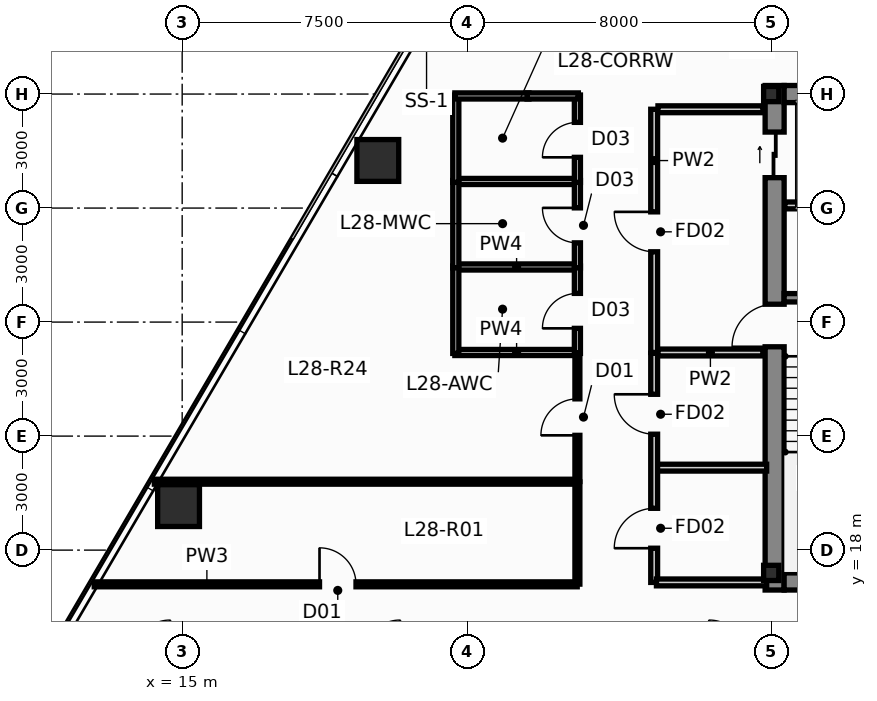
"""IFC4 building model, lengths in metres.
Left out: names, types, materials, properties, quantities, classifications, styles, units other than length and angle.
Written with IfcOpenShell. Run it as: python <this file> out.ifc"""

import sys

from ifc_helpers import new_model, si_unit, direction, frame, frame_2d, origin, origin_2d, place, context, subcontext, project, spatial, rectangle, hollow_rectangle, i_section, extrude, source, transform, mapped, element, fill, save


model = new_model("IFC4")
c1 = context("Model", 3, precision=1e-05, world=origin(), true_north=direction((0.0, 1.0)))
c2 = subcontext(c1, "Body", "Model", "MODEL_VIEW")
j1 = project(units=[si_unit("LENGTHUNIT", "METRE"), si_unit("PLANEANGLEUNIT", "RADIAN")], contexts=[c1])
p1 = place(None, origin())
s1 = spatial("IfcSite", under=j1, at=p1, CompositionType="ELEMENT")
p2 = place(p1, origin())
s2 = spatial("IfcBuilding", under=s1, at=p2, CompositionType="ELEMENT")
p3 = place(p2, frame((0.0, 0.0, 109.05)))
s3 = spatial("IfcBuildingStorey", under=s2, at=p3, CompositionType="ELEMENT", Elevation=109.05)
m1 = source(origin(), c2, "Body", "SweptSolid", [
    extrude(i_section(OverallWidth=0.4, OverallDepth=0.4, WebThickness=0.02, FlangeThickness=0.032, at=origin_2d()), origin(), (0.0, 0.0, 1.0), 3.65),
])
for number, where, z_axis, x_axis in (
    (1, (30.5, 17.4, 0.0), (0.0, 0.0, 1.0), (1.0, 0.0, 0.0)),
    (2, (30.5, 30.0, 0.0), (0.0, 0.0, 1.0), (1.0, 0.0, 0.0)),
):
    element("IfcColumn", number, at=place(p3, frame(where, z_axis=z_axis, x_axis=x_axis)), inside=s3, PredefinedType="COLUMN", context=c2, shape_type="MappedRepresentation", body=[
        mapped(m1, transform((0.0, 0.0, 0.0), scale=1.0)),
    ])
p4 = place(p3, frame((30.59, 16.95, 0.0), z_axis=(0.0, 0.0, 1.0), x_axis=(0.0, 1.0, 0.0)))
e3 = element("IfcWall", 3, at=p4, inside=s3, PredefinedType="SHEAR", context=c2, shape_type="SweptSolid", body=[
    extrude(rectangle(XDim=13.275, YDim=0.5, at=frame_2d((6.638, 0.0))), origin(), (0.0, 0.0, 1.0), 3.65),
])
p5 = place(p4, frame((6.4, 0.0, 0.0)))
e4 = element("IfcOpeningElement", 4, at=p5, cuts=e3, PredefinedType="OPENING", context=c2, shape_type="SweptSolid", body=[
    extrude(rectangle(XDim=1.12, YDim=2.15, at=frame_2d((0.56, 1.075))), frame((0.0, 0.262, 0.0), z_axis=(0.0, -1.0, 0.0), x_axis=(1.0, 0.0, 0.0)), (0.0, 0.0, 1.0), 0.524),
])
p6 = place(p4, frame((10.85, 0.0, 0.0)))
e5 = element("IfcOpeningElement", 5, at=p6, cuts=e3, PredefinedType="OPENING", context=c2, shape_type="SweptSolid", body=[
    extrude(rectangle(XDim=1.2, YDim=2.2, at=frame_2d((0.6, 1.1))), frame((0.0, 0.262, 0.0), z_axis=(0.0, -1.0, 0.0), x_axis=(1.0, 0.0, 0.0)), (0.0, 0.0, 1.0), 0.524),
])
for number, where, z_axis, x_axis in (
    (6, (30.84, 17.175, 0.0), (0.0, 0.0, 1.0), (1.0, 0.0, 0.0)),
    (7, (30.84, 30.0, 0.0), (0.0, 0.0, 1.0), (1.0, 0.0, 0.0)),
):
    element("IfcWall", number, at=place(p3, frame(where, z_axis=z_axis, x_axis=x_axis)), inside=s3, PredefinedType="SHEAR", context=c2, shape_type="SweptSolid", body=[
        extrude(rectangle(XDim=2.9, YDim=0.45, at=frame_2d((1.45, 0.0))), origin(), (0.0, 0.0, 1.0), 3.65),
    ])
p7 = place(p3, frame((30.84, 24.64, 0.0), z_axis=(0.0, 0.0, 1.0), x_axis=(1.0, 0.0, 0.0)))
e8 = element("IfcWall", 8, at=p7, inside=s3, PredefinedType="SHEAR", context=c2, shape_type="SweptSolid", body=[
    extrude(rectangle(XDim=2.9, YDim=0.22, at=frame_2d((1.45, 0.0))), origin(), (0.0, 0.0, 1.0), 3.65),
])
m2 = source(origin(), c2, "Body", "SweptSolid", [
    extrude(hollow_rectangle(XDim=1.1, YDim=1.1, WallThickness=0.06, at=origin_2d()), origin(), (0.0, 0.0, 1.0), 3.651),
])
p8 = place(p3, frame((20.148, 28.253, 0.0), z_axis=(0.014913313399, -0.013776424037, 0.999793880369), x_axis=(0.678553674548, 0.734550822447, 0.0)))
e9 = element("IfcColumn", 9, at=p8, inside=s3, PredefinedType="COLUMN", context=c2, shape_type="MappedRepresentation", body=[
    mapped(m2, transform((0.0, 0.0, 0.0), scale=1.0)),
])
m3 = source(origin(), c2, "Body", "SweptSolid", [
    extrude(hollow_rectangle(XDim=1.1, YDim=1.1, WallThickness=0.06, at=origin_2d()), origin(), (0.0, 0.0, 1.0), 3.651),
])
p9 = place(p3, frame((14.905, 19.171, 0.0), z_axis=(0.010431780378, -0.021599135014, 0.999712286273), x_axis=(0.900476348161, 0.434904985489, 0.0)))
e10 = element("IfcColumn", 10, at=p9, inside=s3, PredefinedType="COLUMN", context=c2, shape_type="MappedRepresentation", body=[
    mapped(m3, transform((0.0, 0.0, 0.0), scale=1.0)),
])
p10 = place(p3, frame((27.42, 23.2, 0.0), z_axis=(0.0, 0.0, 1.0), x_axis=(0.0, 1.0, 0.0)))
e11 = element("IfcWall", 11, at=p10, inside=s3, PredefinedType="PARTITIONING", context=c2, shape_type="SweptSolid", body=[
    extrude(rectangle(XDim=6.4, YDim=0.18, at=frame_2d((3.2, 0.0))), origin(), (0.0, 0.0, 1.0), 3.026),
])
p11 = place(p10, frame((2.65, 0.0, 0.0)))
e12 = element("IfcOpeningElement", 12, at=p11, cuts=e11, PredefinedType="OPENING", context=c2, shape_type="SweptSolid", body=[
    extrude(rectangle(XDim=1.05, YDim=2.15, at=frame_2d((0.525, 1.075))), frame((0.0, 0.102, 0.0), z_axis=(0.0, -1.0, 0.0), x_axis=(1.0, 0.0, 0.0)), (0.0, 0.0, 1.0), 0.204),
])
p12 = place(p3, frame((27.52, 23.2, 0.0), z_axis=(0.0, 0.0, 1.0), x_axis=(1.0, 0.0, 0.0)))
e13 = element("IfcWall", 13, at=p12, inside=s3, PredefinedType="PARTITIONING", context=c2, shape_type="SweptSolid", body=[
    extrude(rectangle(XDim=2.76, YDim=0.18, at=frame_2d((1.38, 0.0))), origin(), (0.0, 0.0, 1.0), 3.4),
])
p13 = place(p3, frame((27.52, 29.6, 0.0), z_axis=(0.0, 0.0, 1.0), x_axis=(1.0, 0.0, 0.0)))
e14 = element("IfcWall", 14, at=p13, inside=s3, PredefinedType="PARTITIONING", context=c2, shape_type="SweptSolid", body=[
    extrude(rectangle(XDim=2.76, YDim=0.18, at=frame_2d((1.38, 0.0))), origin(), (0.0, 0.0, 1.0), 2.783),
])
for number, where, z_axis, x_axis in (
    (15, (30.86, 27.07, 0.0), (0.0, 0.0, 1.0), (1.0, 0.0, 0.0)),
    (16, (27.48, 20.17, 0.0), (0.0, 0.0, 1.0), (1.0, 0.0, 0.0)),
):
    element("IfcWall", number, at=place(p3, frame(where, z_axis=z_axis, x_axis=x_axis)), inside=s3, PredefinedType="PARTITIONING", context=c2, shape_type="SweptSolid", body=[
        extrude(rectangle(XDim=2.9, YDim=0.18, at=frame_2d((1.45, 0.0))), origin(), (0.0, 0.0, 1.0), 3.4),
    ])
p14 = place(p3, frame((27.42, 17.15, 0.0), z_axis=(0.0, 0.0, 1.0), x_axis=(0.0, 1.0, 0.0)))
e17 = element("IfcWall", 17, at=p14, inside=s3, PredefinedType="PARTITIONING", context=c2, shape_type="SweptSolid", body=[
    extrude(rectangle(XDim=6.03, YDim=0.18, at=frame_2d((3.015, 0.0))), origin(), (0.0, 0.0, 1.0), 3.026),
])
p15 = place(p14, frame((0.9, 0.0, 0.0)))
e18 = element("IfcOpeningElement", 18, at=p15, cuts=e17, PredefinedType="OPENING", context=c2, shape_type="SweptSolid", body=[
    extrude(rectangle(XDim=1.05, YDim=2.15, at=frame_2d((0.525, 1.075))), frame((0.0, 0.102, 0.0), z_axis=(0.0, -1.0, 0.0), x_axis=(1.0, 0.0, 0.0)), (0.0, 0.0, 1.0), 0.204),
])
p16 = place(p14, frame((3.9, 0.0, 0.0)))
e19 = element("IfcOpeningElement", 19, at=p16, cuts=e17, PredefinedType="OPENING", context=c2, shape_type="SweptSolid", body=[
    extrude(rectangle(XDim=1.05, YDim=2.15, at=frame_2d((0.525, 1.075))), frame((0.0, 0.102, 0.0), z_axis=(0.0, -1.0, 0.0), x_axis=(1.0, 0.0, 0.0)), (0.0, 0.0, 1.0), 0.204),
])
p17 = place(p3, frame((27.48, 17.15, 0.0), z_axis=(0.0, 0.0, 1.0), x_axis=(1.0, 0.0, 0.0)))
e20 = element("IfcWall", 20, at=p17, inside=s3, PredefinedType="PARTITIONING", context=c2, shape_type="SweptSolid", body=[
    extrude(rectangle(XDim=2.9, YDim=0.18, at=frame_2d((1.45, 0.0))), origin(), (0.0, 0.0, 1.0), 2.783),
])
for number, where, z_axis, x_axis in (
    (21, (22.175, 23.2, 0.0), (0.0, 0.0, 1.0), (1.0, 0.0, 0.0)),
    (22, (22.175, 25.45, 0.0), (0.0, 0.0, 1.0), (1.0, 0.0, 0.0)),
    (23, (22.175, 27.7, 0.0), (0.0, 0.0, 1.0), (1.0, 0.0, 0.0)),
):
    element("IfcWall", number, at=place(p3, frame(where, z_axis=z_axis, x_axis=x_axis)), inside=s3, PredefinedType="PLUMBINGWALL", context=c2, shape_type="SweptSolid", body=[
        extrude(rectangle(XDim=3.25, YDim=0.16, at=frame_2d((1.625, 0.0))), origin(), (0.0, 0.0, 1.0), 3.4),
    ])
p18 = place(p3, frame((25.4, 23.175, 0.0), z_axis=(0.0, 0.0, 1.0), x_axis=(0.0, 1.0, 0.0)))
e24 = element("IfcWall", 24, at=p18, inside=s3, PredefinedType="PLUMBINGWALL", context=c2, shape_type="SweptSolid", body=[
    extrude(rectangle(XDim=2.3, YDim=0.16, at=frame_2d((1.15, 0.0))), origin(), (0.0, 0.0, 1.0), 3.4),
])
p19 = place(p18, frame((0.66, 0.0, 0.0)))
e25 = element("IfcOpeningElement", 25, at=p19, cuts=e24, PredefinedType="OPENING", context=c2, shape_type="SweptSolid", body=[
    extrude(rectangle(XDim=0.92, YDim=2.1, at=frame_2d((0.46, 1.05))), frame((0.0, 0.092, 0.0), z_axis=(0.0, -1.0, 0.0), x_axis=(1.0, 0.0, 0.0)), (0.0, 0.0, 1.0), 0.184),
])
p20 = place(p3, frame((25.4, 25.425, 0.0), z_axis=(0.0, 0.0, 1.0), x_axis=(0.0, 1.0, 0.0)))
e26 = element("IfcWall", 26, at=p20, inside=s3, PredefinedType="PLUMBINGWALL", context=c2, shape_type="SweptSolid", body=[
    extrude(rectangle(XDim=2.3, YDim=0.16, at=frame_2d((1.15, 0.0))), origin(), (0.0, 0.0, 1.0), 3.026),
])
p21 = place(p20, frame((0.66, 0.0, 0.0)))
e27 = element("IfcOpeningElement", 27, at=p21, cuts=e26, PredefinedType="OPENING", context=c2, shape_type="SweptSolid", body=[
    extrude(rectangle(XDim=0.92, YDim=2.1, at=frame_2d((0.46, 1.05))), frame((0.0, 0.092, 0.0), z_axis=(0.0, -1.0, 0.0), x_axis=(1.0, 0.0, 0.0)), (0.0, 0.0, 1.0), 0.184),
])
p22 = place(p3, frame((25.4, 27.675, 0.0), z_axis=(0.0, 0.0, 1.0), x_axis=(0.0, 1.0, 0.0)))
e28 = element("IfcWall", 28, at=p22, inside=s3, PredefinedType="PLUMBINGWALL", context=c2, shape_type="SweptSolid", body=[
    extrude(rectangle(XDim=2.3, YDim=0.16, at=frame_2d((1.15, 0.0))), origin(), (0.0, 0.0, 1.0), 3.026),
])
p23 = place(p22, frame((0.66, 0.0, 0.0)))
e29 = element("IfcOpeningElement", 29, at=p23, cuts=e28, PredefinedType="OPENING", context=c2, shape_type="SweptSolid", body=[
    extrude(rectangle(XDim=0.92, YDim=2.1, at=frame_2d((0.46, 1.05))), frame((0.0, 0.092, 0.0), z_axis=(0.0, -1.0, 0.0), x_axis=(1.0, 0.0, 0.0)), (0.0, 0.0, 1.0), 0.184),
])
for number, where, z_axis, x_axis in (
    (30, (22.2, 25.475, 0.0), (0.0, 0.0, 1.0), (0.0, -1.0, 0.0)),
    (31, (22.2, 25.425, 0.0), (0.0, 0.0, 1.0), (0.0, 1.0, 0.0)),
):
    element("IfcWall", number, at=place(p3, frame(where, z_axis=z_axis, x_axis=x_axis)), inside=s3, PredefinedType="PLUMBINGWALL", context=c2, shape_type="SweptSolid", body=[
        extrude(rectangle(XDim=2.3, YDim=0.16, at=frame_2d((1.15, 0.0))), origin(), (0.0, 0.0, 1.0), 3.026),
    ])
p24 = place(p3, frame((22.2, 27.675, 0.0), z_axis=(0.0, 0.0, 1.0), x_axis=(0.0, 1.0, 0.0)))
e32 = element("IfcWall", 32, at=p24, inside=s3, PredefinedType="PLUMBINGWALL", context=c2, shape_type="SweptSolid", body=[
    extrude(rectangle(XDim=2.3, YDim=0.16, at=frame_2d((1.15, 0.0))), origin(), (0.0, 0.0, 1.0), 3.4),
])
p25 = place(p3, frame((22.175, 29.95, 0.0), z_axis=(0.0, 0.0, 1.0), x_axis=(1.0, 0.0, 0.0)))
e33 = element("IfcWall", 33, at=p25, inside=s3, PredefinedType="PLUMBINGWALL", context=c2, shape_type="SweptSolid", body=[
    extrude(rectangle(XDim=1.95, YDim=0.16, at=frame_2d((0.975, 0.0))), origin(), (0.0, 0.0, 1.0), 3.4),
])
p26 = place(p3, frame((24.075, 29.95, 0.0), z_axis=(0.0, 0.0, 1.0), x_axis=(1.0, 0.0, 0.0)))
e34 = element("IfcWall", 34, at=p26, inside=s3, PredefinedType="PLUMBINGWALL", context=c2, shape_type="SweptSolid", body=[
    extrude(rectangle(XDim=1.35, YDim=0.16, at=frame_2d((0.675, 0.0))), origin(), (0.0, 0.0, 1.0), 3.4),
])
p27 = place(p3, frame((12.686, 17.1, 0.0), z_axis=(0.0, 0.0, 1.0), x_axis=(1.0, 0.0, 0.0)))
e35 = element("IfcWall", 35, at=p27, inside=s3, PredefinedType="PARTITIONING", context=c2, shape_type="SweptSolid", body=[
    extrude(rectangle(XDim=12.709, YDim=0.13, at=frame_2d((6.354, 0.0))), origin(), (0.0, 0.0, 1.0), 3.4),
])
p28 = place(p27, frame((5.928, 0.0, 0.0)))
e36 = element("IfcOpeningElement", 36, at=p28, cuts=e35, PredefinedType="OPENING", context=c2, shape_type="SweptSolid", body=[
    extrude(rectangle(XDim=0.96, YDim=2.15, at=frame_2d((0.48, 1.075))), frame((0.0, 0.077, 0.0), z_axis=(0.0, -1.0, 0.0), x_axis=(1.0, 0.0, 0.0)), (0.0, 0.0, 1.0), 0.154),
])
p29 = place(p3, frame((14.268, 19.8, 0.0), z_axis=(0.0, 0.0, 1.0), x_axis=(1.0, 0.0, 0.0)))
e37 = element("IfcWall", 37, at=p29, inside=s3, PredefinedType="PARTITIONING", context=c2, shape_type="SweptSolid", body=[
    extrude(rectangle(XDim=11.127, YDim=0.13, at=frame_2d((5.563, 0.0))), origin(), (0.0, 0.0, 1.0), 3.4),
])
p30 = place(p3, frame((25.4, 19.805, 0.0), z_axis=(0.0, 0.0, 1.0), x_axis=(0.0, 1.0, 0.0)))
e38 = element("IfcWall", 38, at=p30, inside=s3, PredefinedType="PARTITIONING", context=c2, shape_type="SweptSolid", body=[
    extrude(rectangle(XDim=3.39, YDim=0.13, at=frame_2d((1.695, 0.0))), origin(), (0.0, 0.0, 1.0), 3.026),
])
p31 = place(p30, frame((1.215, 0.0, 0.0)))
e39 = element("IfcOpeningElement", 39, at=p31, cuts=e38, PredefinedType="OPENING", context=c2, shape_type="SweptSolid", body=[
    extrude(rectangle(XDim=0.96, YDim=2.15, at=frame_2d((0.48, 1.075))), frame((0.0, 0.077, 0.0), z_axis=(0.0, -1.0, 0.0), x_axis=(1.0, 0.0, 0.0)), (0.0, 0.0, 1.0), 0.154),
])
p32 = place(p3, frame((25.4, 17.105, 0.0), z_axis=(0.0, 0.0, 1.0), x_axis=(0.0, 1.0, 0.0)))
e40 = element("IfcWall", 40, at=p32, inside=s3, PredefinedType="PARTITIONING", context=c2, shape_type="SweptSolid", body=[
    extrude(rectangle(XDim=2.69, YDim=0.13, at=frame_2d((1.345, 0.0))), origin(), (0.0, 0.0, 1.0), 3.026),
])
p33 = place(p5, origin())
e41 = element("IfcDoor", 41, at=p33, inside=s3, OperationType="SINGLE_SWING_LEFT", PredefinedType="DOOR", context=c2, shape_type="SweptSolid", body=[
    extrude(rectangle(XDim=1.12, YDim=2.15, at=frame_2d((0.56, 1.075))), frame((0.0, 0.025, 0.0), z_axis=(0.0, -1.0, 0.0), x_axis=(1.0, 0.0, 0.0)), (0.0, 0.0, 1.0), 0.05),
])
fill(e4, e41)
p34 = place(p6, origin())
e42 = element("IfcDoor", 42, at=p34, inside=s3, OperationType="SLIDING_TO_LEFT", PredefinedType="DOOR", context=c2, shape_type="SweptSolid", body=[
    extrude(rectangle(XDim=1.2, YDim=2.2, at=frame_2d((0.6, 1.1))), frame((0.0, 0.025, 0.0), z_axis=(0.0, -1.0, 0.0), x_axis=(1.0, 0.0, 0.0)), (0.0, 0.0, 1.0), 0.05),
])
fill(e5, e42)
p35 = place(p11, origin())
e43 = element("IfcDoor", 43, at=p35, inside=s3, OperationType="SINGLE_SWING_RIGHT", PredefinedType="DOOR", context=c2, shape_type="SweptSolid", body=[
    extrude(rectangle(XDim=1.05, YDim=2.15, at=frame_2d((0.525, 1.075))), frame((0.0, 0.025, 0.0), z_axis=(0.0, -1.0, 0.0), x_axis=(1.0, 0.0, 0.0)), (0.0, 0.0, 1.0), 0.05),
])
fill(e12, e43)
p36 = place(p15, origin())
e44 = element("IfcDoor", 44, at=p36, inside=s3, OperationType="SINGLE_SWING_LEFT", PredefinedType="DOOR", context=c2, shape_type="SweptSolid", body=[
    extrude(rectangle(XDim=1.05, YDim=2.15, at=frame_2d((0.525, 1.075))), frame((0.0, 0.025, 0.0), z_axis=(0.0, -1.0, 0.0), x_axis=(1.0, 0.0, 0.0)), (0.0, 0.0, 1.0), 0.05),
])
fill(e18, e44)
p37 = place(p16, origin())
e45 = element("IfcDoor", 45, at=p37, inside=s3, OperationType="SINGLE_SWING_RIGHT", PredefinedType="DOOR", context=c2, shape_type="SweptSolid", body=[
    extrude(rectangle(XDim=1.05, YDim=2.15, at=frame_2d((0.525, 1.075))), frame((0.0, 0.025, 0.0), z_axis=(0.0, -1.0, 0.0), x_axis=(1.0, 0.0, 0.0)), (0.0, 0.0, 1.0), 0.05),
])
fill(e19, e45)
p38 = place(p19, origin())
e46 = element("IfcDoor", 46, at=p38, inside=s3, OperationType="SINGLE_SWING_LEFT", PredefinedType="DOOR", context=c2, shape_type="SweptSolid", body=[
    extrude(rectangle(XDim=0.92, YDim=2.1, at=frame_2d((0.46, 1.05))), frame((0.0, 0.025, 0.0), z_axis=(0.0, -1.0, 0.0), x_axis=(1.0, 0.0, 0.0)), (0.0, 0.0, 1.0), 0.05),
])
fill(e25, e46)
p39 = place(p21, origin())
e47 = element("IfcDoor", 47, at=p39, inside=s3, OperationType="SINGLE_SWING_RIGHT", PredefinedType="DOOR", context=c2, shape_type="SweptSolid", body=[
    extrude(rectangle(XDim=0.92, YDim=2.1, at=frame_2d((0.46, 1.05))), frame((0.0, 0.025, 0.0), z_axis=(0.0, -1.0, 0.0), x_axis=(1.0, 0.0, 0.0)), (0.0, 0.0, 1.0), 0.05),
])
fill(e27, e47)
p40 = place(p23, origin())
e48 = element("IfcDoor", 48, at=p40, inside=s3, OperationType="SINGLE_SWING_LEFT", PredefinedType="DOOR", context=c2, shape_type="SweptSolid", body=[
    extrude(rectangle(XDim=0.92, YDim=2.1, at=frame_2d((0.46, 1.05))), frame((0.0, 0.025, 0.0), z_axis=(0.0, -1.0, 0.0), x_axis=(1.0, 0.0, 0.0)), (0.0, 0.0, 1.0), 0.05),
])
fill(e29, e48)
p41 = place(p28, origin())
e49 = element("IfcDoor", 49, at=p41, inside=s3, OperationType="SINGLE_SWING_LEFT", PredefinedType="DOOR", context=c2, shape_type="SweptSolid", body=[
    extrude(rectangle(XDim=0.96, YDim=2.15, at=frame_2d((0.48, 1.075))), frame((0.0, 0.025, 0.0), z_axis=(0.0, -1.0, 0.0), x_axis=(1.0, 0.0, 0.0)), (0.0, 0.0, 1.0), 0.05),
])
fill(e36, e49)
p42 = place(p31, origin())
e50 = element("IfcDoor", 50, at=p42, inside=s3, OperationType="SINGLE_SWING_LEFT", PredefinedType="DOOR", context=c2, shape_type="SweptSolid", body=[
    extrude(rectangle(XDim=0.96, YDim=2.15, at=frame_2d((0.48, 1.075))), frame((0.0, 0.025, 0.0), z_axis=(0.0, -1.0, 0.0), x_axis=(1.0, 0.0, 0.0)), (0.0, 0.0, 1.0), 0.05),
])
fill(e39, e50)
save(model, sys.argv[1])
